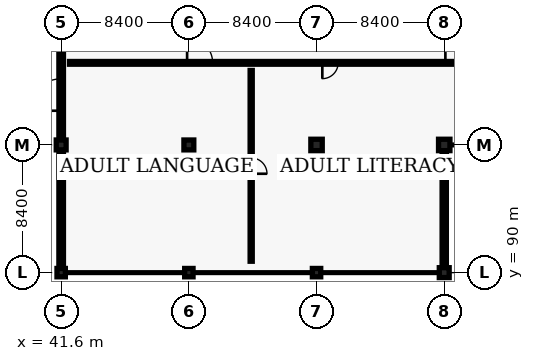
"""IFC4 building model, lengths in metres.
Left out: names, types, materials, properties, quantities, classifications, styles, units other than length and angle.
Written with IfcOpenShell. Run it as: python <this file> out.ifc"""

import sys

from ifc_helpers import new_model, si_unit, direction, frame, frame_2d, origin, origin_2d, place, context, subcontext, project, spatial, rectangle, circle, extrude, element, fill, save


model = new_model("IFC4")
c1 = context("Model", 3, precision=1e-05, world=origin(), true_north=direction((0.0, 1.0)))
c2 = subcontext(c1, "Body", "Model", "MODEL_VIEW")
j1 = project(units=[si_unit("LENGTHUNIT", "METRE"), si_unit("PLANEANGLEUNIT", "RADIAN")], contexts=[c1])
p1 = place(None, origin())
s1 = spatial("IfcSite", under=j1, at=p1, CompositionType="ELEMENT")
p2 = place(p1, origin())
s2 = spatial("IfcBuilding", under=s1, at=p2, CompositionType="ELEMENT")
p3 = place(p2, origin())
s3 = spatial("IfcBuildingStorey", under=s2, at=p3, CompositionType="ELEMENT", Elevation=0.0)
p4 = place(p3, frame((41.6, 90.0, 0.0), z_axis=(0.0, 0.0, 1.0), x_axis=(1.0, 0.0, 0.0)))
e1 = element("IfcColumn", 1, at=p4, inside=s3, PredefinedType="PILASTER", context=c2, shape_type="SweptSolid", body=[
    extrude(circle(Radius=0.275, at=origin_2d()), origin(), (0.0, 0.0, 1.0), 4.8),
])
p5 = place(p3, frame((41.6, 98.4, 0.0), z_axis=(0.0, 0.0, 1.0), x_axis=(1.0, 0.0, 0.0)))
e2 = element("IfcColumn", 2, at=p5, inside=s3, PredefinedType="COLUMN", context=c2, shape_type="SweptSolid", body=[
    extrude(rectangle(XDim=0.65, YDim=0.65, at=origin_2d()), origin(), (0.0, 0.0, 1.0), 4.8),
])
p6 = place(p3, frame((50.0, 90.0, 0.0), z_axis=(0.0, 0.0, 1.0), x_axis=(1.0, 0.0, 0.0)))
e3 = element("IfcColumn", 3, at=p6, inside=s3, PredefinedType="PILASTER", context=c2, shape_type="SweptSolid", body=[
    extrude(circle(Radius=0.275, at=origin_2d()), origin(), (0.0, 0.0, 1.0), 4.8),
])
p7 = place(p3, frame((50.0, 98.4, 0.0), z_axis=(0.0, 0.0, 1.0), x_axis=(1.0, 0.0, 0.0)))
e4 = element("IfcColumn", 4, at=p7, inside=s3, PredefinedType="COLUMN", context=c2, shape_type="SweptSolid", body=[
    extrude(rectangle(XDim=0.65, YDim=0.65, at=origin_2d()), origin(), (0.0, 0.0, 1.0), 4.8),
])
p8 = place(p3, frame((58.4, 90.0, 0.0), z_axis=(0.0, 0.0, 1.0), x_axis=(1.0, 0.0, 0.0)))
e5 = element("IfcColumn", 5, at=p8, inside=s3, PredefinedType="PILASTER", context=c2, shape_type="SweptSolid", body=[
    extrude(circle(Radius=0.275, at=origin_2d()), origin(), (0.0, 0.0, 1.0), 4.8),
])
p9 = place(p3, frame((58.4, 98.4, 0.0), z_axis=(0.0, 0.0, 1.0), x_axis=(1.0, 0.0, 0.0)))
e6 = element("IfcColumn", 6, at=p9, inside=s3, PredefinedType="COLUMN", context=c2, shape_type="SweptSolid", body=[
    extrude(rectangle(XDim=0.75, YDim=0.75, at=origin_2d()), origin(), (0.0, 0.0, 1.0), 4.8),
])
p10 = place(p3, frame((66.8, 90.0, 0.0), z_axis=(0.0, 0.0, 1.0), x_axis=(1.0, 0.0, 0.0)))
e7 = element("IfcColumn", 7, at=p10, inside=s3, PredefinedType="COLUMN", context=c2, shape_type="SweptSolid", body=[
    extrude(rectangle(XDim=0.65, YDim=0.65, at=origin_2d()), origin(), (0.0, 0.0, 1.0), 4.8),
])
p11 = place(p3, frame((66.8, 98.4, 0.0), z_axis=(0.0, 0.0, 1.0), x_axis=(1.0, 0.0, 0.0)))
e8 = element("IfcColumn", 8, at=p11, inside=s3, PredefinedType="COLUMN", context=c2, shape_type="SweptSolid", body=[
    extrude(rectangle(XDim=0.75, YDim=0.75, at=origin_2d()), origin(), (0.0, 0.0, 1.0), 4.8),
])
p12 = place(p3, frame((41.6, 90.1, 0.0), z_axis=(0.0, 0.0, 1.0), x_axis=(0.0, 1.0, 0.0)))
e9 = element("IfcWall", 9, at=p12, inside=s3, PredefinedType="SOLIDWALL", context=c2, shape_type="SweptSolid", body=[
    extrude(rectangle(XDim=8.2, YDim=0.3, at=frame_2d((4.1, 0.0))), origin(), (0.0, 0.0, 1.0), 4.075),
])
p13 = place(p3, frame((41.6, 98.5, 0.0), z_axis=(0.0, 0.0, 1.0), x_axis=(0.0, 1.0, 0.0)))
e10 = element("IfcWall", 10, at=p13, inside=s3, PredefinedType="SOLIDWALL", context=c2, shape_type="SweptSolid", body=[
    extrude(rectangle(XDim=8.2, YDim=0.3, at=frame_2d((4.1, 0.0))), origin(), (0.0, 0.0, 1.0), 4.075),
])
p14 = place(p13, frame((2.15, 0.0, 0.0)))
e11 = element("IfcOpeningElement", 11, at=p14, cuts=e10, PredefinedType="OPENING", context=c2, shape_type="SweptSolid", body=[
    extrude(rectangle(XDim=2.1, YDim=2.35, at=frame_2d((1.05, 1.175))), frame((0.0, 0.16, 0.0), z_axis=(0.0, -1.0, 0.0), x_axis=(1.0, 0.0, 0.0)), (0.0, 0.0, 1.0), 0.32),
])
p15 = place(p3, frame((66.8, 90.15, 0.0), z_axis=(0.0, 0.0, 1.0), x_axis=(0.0, 1.0, 0.0)))
e12 = element("IfcWall", 12, at=p15, inside=s3, PredefinedType="SOLIDWALL", context=c2, shape_type="SweptSolid", body=[
    extrude(rectangle(XDim=8.1, YDim=0.28, at=frame_2d((4.05, 0.0))), origin(), (0.0, 0.0, 1.0), 3.775),
])
p16 = place(p3, frame((42.15, 103.8, 0.0), z_axis=(0.0, 0.0, 1.0), x_axis=(1.0, 0.0, 0.0)))
e13 = element("IfcWall", 13, at=p16, inside=s3, PredefinedType="PARTITIONING", context=c2, shape_type="SweptSolid", body=[
    extrude(rectangle(XDim=102.9, YDim=0.18, at=frame_2d((51.45, 0.0))), origin(), (0.0, 0.0, 1.0), 3.775),
])
p17 = place(p16, frame((7.735, 0.0, 0.0)))
e14 = element("IfcOpeningElement", 14, at=p17, cuts=e13, PredefinedType="OPENING", context=c2, shape_type="SweptSolid", body=[
    extrude(rectangle(XDim=1.68, YDim=2.26, at=frame_2d((0.84, 1.13))), frame((0.0, 0.1, 0.0), z_axis=(0.0, -1.0, 0.0), x_axis=(1.0, 0.0, 0.0)), (0.0, 0.0, 1.0), 0.2),
])
p18 = place(p16, frame((16.63, 0.0, 0.0)))
e15 = element("IfcOpeningElement", 15, at=p18, cuts=e13, PredefinedType="OPENING", context=c2, shape_type="SweptSolid", body=[
    extrude(rectangle(XDim=1.04, YDim=2.08, at=frame_2d((0.52, 1.04))), frame((0.0, 0.1, 0.0), z_axis=(0.0, -1.0, 0.0), x_axis=(1.0, 0.0, 0.0)), (0.0, 0.0, 1.0), 0.2),
])
p19 = place(p16, frame((24.725, 0.0, 0.0)))
e16 = element("IfcOpeningElement", 16, at=p19, cuts=e13, PredefinedType="OPENING", context=c2, shape_type="SweptSolid", body=[
    extrude(rectangle(XDim=2.0, YDim=2.3, at=frame_2d((1.0, 1.15))), frame((0.0, 0.1, 0.0), z_axis=(0.0, -1.0, 0.0), x_axis=(1.0, 0.0, 0.0)), (0.0, 0.0, 1.0), 0.2),
])
p20 = place(p16, frame((33.375, 0.0, 0.0)))
e17 = element("IfcOpeningElement", 17, at=p20, cuts=e13, PredefinedType="OPENING", context=c2, shape_type="SweptSolid", body=[
    extrude(rectangle(XDim=1.85, YDim=2.22, at=frame_2d((0.925, 1.11))), frame((0.0, 0.1, 0.0), z_axis=(0.0, -1.0, 0.0), x_axis=(1.0, 0.0, 0.0)), (0.0, 0.0, 1.0), 0.2),
])
p21 = place(p16, frame((42.315, 0.0, 0.0)))
e18 = element("IfcOpeningElement", 18, at=p21, cuts=e13, PredefinedType="OPENING", context=c2, shape_type="SweptSolid", body=[
    extrude(rectangle(XDim=1.12, YDim=2.16, at=frame_2d((0.56, 1.08))), frame((0.0, 0.1, 0.0), z_axis=(0.0, -1.0, 0.0), x_axis=(1.0, 0.0, 0.0)), (0.0, 0.0, 1.0), 0.2),
])
p22 = place(p16, frame((50.92, 0.0, 0.0)))
e19 = element("IfcOpeningElement", 19, at=p22, cuts=e13, PredefinedType="OPENING", context=c2, shape_type="SweptSolid", body=[
    extrude(rectangle(XDim=1.06, YDim=2.16, at=frame_2d((0.53, 1.08))), frame((0.0, 0.1, 0.0), z_axis=(0.0, -1.0, 0.0), x_axis=(1.0, 0.0, 0.0)), (0.0, 0.0, 1.0), 0.2),
])
p23 = place(p16, frame((59.525, 0.0, 0.0)))
e20 = element("IfcOpeningElement", 20, at=p23, cuts=e13, PredefinedType="OPENING", context=c2, shape_type="SweptSolid", body=[
    extrude(rectangle(XDim=1.0, YDim=2.14, at=frame_2d((0.5, 1.07))), frame((0.0, 0.1, 0.0), z_axis=(0.0, -1.0, 0.0), x_axis=(1.0, 0.0, 0.0)), (0.0, 0.0, 1.0), 0.2),
])
p24 = place(p16, frame((68.11, 0.0, 0.0)))
e21 = element("IfcOpeningElement", 21, at=p24, cuts=e13, PredefinedType="OPENING", context=c2, shape_type="SweptSolid", body=[
    extrude(rectangle(XDim=0.98, YDim=2.12, at=frame_2d((0.49, 1.06))), frame((0.0, 0.1, 0.0), z_axis=(0.0, -1.0, 0.0), x_axis=(1.0, 0.0, 0.0)), (0.0, 0.0, 1.0), 0.2),
])
p25 = place(p16, frame((76.7, 0.0, 0.0)))
e22 = element("IfcOpeningElement", 22, at=p25, cuts=e13, PredefinedType="OPENING", context=c2, shape_type="SweptSolid", body=[
    extrude(rectangle(XDim=0.95, YDim=2.12, at=frame_2d((0.475, 1.06))), frame((0.0, 0.1, 0.0), z_axis=(0.0, -1.0, 0.0), x_axis=(1.0, 0.0, 0.0)), (0.0, 0.0, 1.0), 0.2),
])
p26 = place(p16, frame((85.29, 0.0, 0.0)))
e23 = element("IfcOpeningElement", 23, at=p26, cuts=e13, PredefinedType="OPENING", context=c2, shape_type="SweptSolid", body=[
    extrude(rectangle(XDim=0.92, YDim=2.1, at=frame_2d((0.46, 1.05))), frame((0.0, 0.1, 0.0), z_axis=(0.0, -1.0, 0.0), x_axis=(1.0, 0.0, 0.0)), (0.0, 0.0, 1.0), 0.2),
])
p27 = place(p16, frame((93.845, 0.0, 0.0)))
e24 = element("IfcOpeningElement", 24, at=p27, cuts=e13, PredefinedType="OPENING", context=c2, shape_type="SweptSolid", body=[
    extrude(rectangle(XDim=0.96, YDim=2.08, at=frame_2d((0.48, 1.04))), frame((0.0, 0.1, 0.0), z_axis=(0.0, -1.0, 0.0), x_axis=(1.0, 0.0, 0.0)), (0.0, 0.0, 1.0), 0.2),
])
p28 = place(p3, frame((54.1, 90.75, 0.0), z_axis=(0.0, 0.0, 1.0), x_axis=(0.0, 1.0, 0.0)))
e25 = element("IfcWall", 25, at=p28, inside=s3, PredefinedType="PARTITIONING", context=c2, shape_type="SweptSolid", body=[
    extrude(rectangle(XDim=12.55, YDim=0.14, at=frame_2d((6.275, 0.0))), origin(), (0.0, 0.0, 1.0), 3.275),
])
p29 = place(p28, frame((5.755, 0.0, 0.0)))
e26 = element("IfcOpeningElement", 26, at=p29, cuts=e25, PredefinedType="OPENING", context=c2, shape_type="SweptSolid", body=[
    extrude(rectangle(XDim=1.04, YDim=2.08, at=frame_2d((0.52, 1.04))), frame((0.0, 0.08, 0.0), z_axis=(0.0, -1.0, 0.0), x_axis=(1.0, 0.0, 0.0)), (0.0, 0.0, 1.0), 0.16),
])
p30 = place(p14, origin())
e27 = element("IfcDoor", 27, at=p30, inside=s3, OperationType="DOUBLE_DOOR_SINGLE_SWING", PredefinedType="DOOR", context=c2, shape_type="SweptSolid", body=[
    extrude(rectangle(XDim=2.1, YDim=2.35, at=frame_2d((1.05, 1.175))), frame((0.0, 0.025, 0.0), z_axis=(0.0, -1.0, 0.0), x_axis=(1.0, 0.0, 0.0)), (0.0, 0.0, 1.0), 0.05),
])
fill(e11, e27)
p31 = place(p17, origin())
e28 = element("IfcDoor", 28, at=p31, inside=s3, OperationType="DOUBLE_DOOR_SINGLE_SWING", PredefinedType="DOOR", context=c2, shape_type="SweptSolid", body=[
    extrude(rectangle(XDim=1.68, YDim=2.26, at=frame_2d((0.84, 1.13))), frame((0.0, 0.025, 0.0), z_axis=(0.0, -1.0, 0.0), x_axis=(1.0, 0.0, 0.0)), (0.0, 0.0, 1.0), 0.05),
])
fill(e14, e28)
p32 = place(p18, origin())
e29 = element("IfcDoor", 29, at=p32, inside=s3, OperationType="SINGLE_SWING_RIGHT", PredefinedType="DOOR", context=c2, shape_type="SweptSolid", body=[
    extrude(rectangle(XDim=1.04, YDim=2.08, at=frame_2d((0.52, 1.04))), frame((0.0, 0.025, 0.0), z_axis=(0.0, -1.0, 0.0), x_axis=(1.0, 0.0, 0.0)), (0.0, 0.0, 1.0), 0.05),
])
fill(e15, e29)
p33 = place(p19, origin())
e30 = element("IfcDoor", 30, at=p33, inside=s3, OperationType="DOUBLE_DOOR_SINGLE_SWING", PredefinedType="DOOR", context=c2, shape_type="SweptSolid", body=[
    extrude(rectangle(XDim=2.0, YDim=2.3, at=frame_2d((1.0, 1.15))), frame((0.0, 0.025, 0.0), z_axis=(0.0, -1.0, 0.0), x_axis=(1.0, 0.0, 0.0)), (0.0, 0.0, 1.0), 0.05),
])
fill(e16, e30)
p34 = place(p29, origin())
e31 = element("IfcDoor", 31, at=p34, inside=s3, OperationType="SINGLE_SWING_RIGHT", PredefinedType="DOOR", context=c2, shape_type="SweptSolid", body=[
    extrude(rectangle(XDim=1.04, YDim=2.08, at=frame_2d((0.52, 1.04))), frame((0.0, 0.025, 0.0), z_axis=(0.0, -1.0, 0.0), x_axis=(1.0, 0.0, 0.0)), (0.0, 0.0, 1.0), 0.05),
])
fill(e26, e31)
save(model, sys.argv[1])
